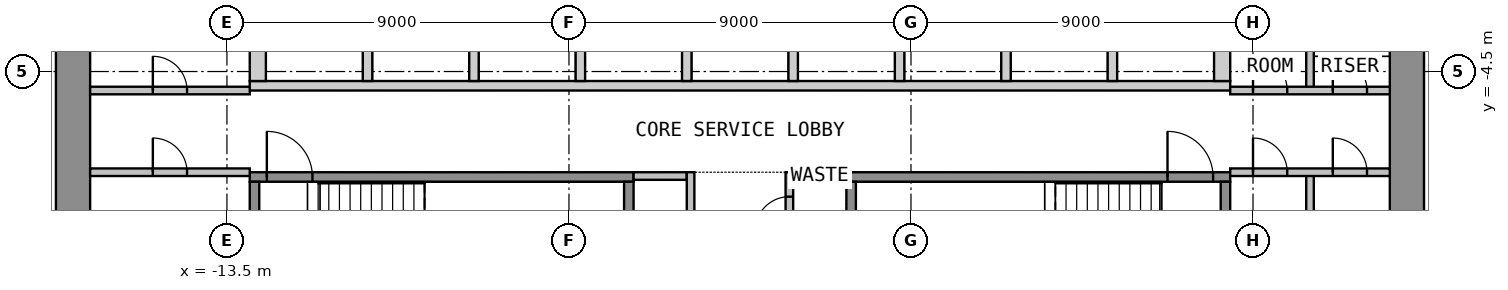
"""IFC4 building model, lengths in metres.
Left out: names, types, materials, properties, quantities, classifications, styles, units other than length and angle.
Written with IfcOpenShell. Run it as: python <this file> out.ifc"""

import sys

from ifc_helpers import new_model, si_unit, direction, frame, frame_2d, origin, place, context, subcontext, project, spatial, polyline, rectangle, outline, extrude, element, fill, save


model = new_model("IFC4")
c1 = context("Model", 3, precision=1e-05, world=origin(), true_north=direction((0.0, 1.0)))
c2 = subcontext(c1, "Body", "Model", "MODEL_VIEW")
j1 = project(units=[si_unit("LENGTHUNIT", "METRE"), si_unit("PLANEANGLEUNIT", "RADIAN")], contexts=[c1])
p1 = place(None, origin())
s1 = spatial("IfcSite", under=j1, at=p1, CompositionType="ELEMENT")
p2 = place(p1, origin())
s2 = spatial("IfcBuilding", under=s1, at=p2, CompositionType="ELEMENT")
p3 = place(p2, frame((0.0, 0.0, 30.0)))
s3 = spatial("IfcBuildingStorey", under=s2, at=p3, CompositionType="ELEMENT", Elevation=30.0)
p4 = place(p3, frame((-17.55, -12.6, 0.0), z_axis=(0.0, 0.0, 1.0), x_axis=(0.0, 1.0, 0.0)))
e1 = element("IfcWall", 1, at=p4, inside=s3, PredefinedType="SHEAR", context=c2, shape_type="SweptSolid", body=[
    extrude(rectangle(XDim=25.2, YDim=0.9, at=frame_2d((12.6, 0.0))), origin(), (0.0, 0.0, 1.0), 3.525),
])
p5 = place(p4, frame((11.4, 0.0, 0.0)))
e2 = element("IfcOpeningElement", 2, at=p5, cuts=e1, PredefinedType="OPENING", context=c2, shape_type="SweptSolid", body=[
    extrude(rectangle(XDim=2.4, YDim=2.1, at=frame_2d((1.2, 1.05))), frame((0.0, 0.46, 0.0), z_axis=(0.0, -1.0, 0.0), x_axis=(1.0, 0.0, 0.0)), (0.0, 0.0, 1.0), 0.92),
])
p6 = place(p3, frame((17.55, -12.6, 0.0), z_axis=(0.0, 0.0, 1.0), x_axis=(0.0, 1.0, 0.0)))
e3 = element("IfcWall", 3, at=p6, inside=s3, PredefinedType="SHEAR", context=c2, shape_type="SweptSolid", body=[
    extrude(rectangle(XDim=25.2, YDim=0.9, at=frame_2d((12.6, 0.0))), origin(), (0.0, 0.0, 1.0), 3.525),
])
p7 = place(p6, frame((11.4, 0.0, 0.0)))
e4 = element("IfcOpeningElement", 4, at=p7, cuts=e3, PredefinedType="OPENING", context=c2, shape_type="SweptSolid", body=[
    extrude(rectangle(XDim=2.4, YDim=2.1, at=frame_2d((1.2, 1.05))), frame((0.0, 0.46, 0.0), z_axis=(0.0, -1.0, 0.0), x_axis=(1.0, 0.0, 0.0)), (0.0, 0.0, 1.0), 0.92),
])
p8 = place(p3, origin())
e5 = element("IfcWall", 5, at=p8, inside=s3, PredefinedType="SHEAR", context=c2, shape_type="SweptSolid", body=[
    extrude(outline(polyline([(-12.9, -5.0), (12.9, -5.0), (12.9, -4.75), (-12.9, -4.75), (-12.9, -5.0)])), origin(), (0.0, 0.0, 1.0), 3.525),
])
p9 = place(p3, origin())
e6 = element("IfcWall", 6, at=p9, inside=s3, PredefinedType="SHEAR", context=c2, shape_type="SweptSolid", body=[
    extrude(outline(polyline([(-12.9, -4.75), (-12.475, -4.75), (-12.475, -2.05), (-12.9, -2.05), (-12.9, -4.75)])), origin(), (0.0, 0.0, 1.0), 3.525),
])
p10 = place(p3, origin())
e7 = element("IfcWall", 7, at=p10, inside=s3, PredefinedType="SHEAR", context=c2, shape_type="SweptSolid", body=[
    extrude(outline(polyline([(-9.925, -4.75), (-9.675, -4.75), (-9.675, -2.05), (-9.925, -2.05), (-9.925, -4.75)])), origin(), (0.0, 0.0, 1.0), 3.525),
])
p11 = place(p3, origin())
e8 = element("IfcWall", 8, at=p11, inside=s3, PredefinedType="SHEAR", context=c2, shape_type="SweptSolid", body=[
    extrude(outline(polyline([(-7.125, -4.75), (-6.875, -4.75), (-6.875, -2.05), (-7.125, -2.05), (-7.125, -4.75)])), origin(), (0.0, 0.0, 1.0), 3.525),
])
p12 = place(p3, origin())
e9 = element("IfcWall", 9, at=p12, inside=s3, PredefinedType="SHEAR", context=c2, shape_type="SweptSolid", body=[
    extrude(outline(polyline([(-4.325, -4.75), (-4.075, -4.75), (-4.075, -2.05), (-4.325, -2.05), (-4.325, -4.75)])), origin(), (0.0, 0.0, 1.0), 3.525),
])
p13 = place(p3, origin())
e10 = element("IfcWall", 10, at=p13, inside=s3, PredefinedType="SHEAR", context=c2, shape_type="SweptSolid", body=[
    extrude(outline(polyline([(-1.525, -4.75), (-1.275, -4.75), (-1.275, -2.05), (-1.525, -2.05), (-1.525, -4.75)])), origin(), (0.0, 0.0, 1.0), 3.525),
])
p14 = place(p3, origin())
e11 = element("IfcWall", 11, at=p14, inside=s3, PredefinedType="SHEAR", context=c2, shape_type="SweptSolid", body=[
    extrude(outline(polyline([(1.275, -4.75), (1.525, -4.75), (1.525, -2.05), (1.275, -2.05), (1.275, -4.75)])), origin(), (0.0, 0.0, 1.0), 3.525),
])
p15 = place(p3, origin())
e12 = element("IfcWall", 12, at=p15, inside=s3, PredefinedType="SHEAR", context=c2, shape_type="SweptSolid", body=[
    extrude(outline(polyline([(4.075, -4.75), (4.325, -4.75), (4.325, -2.05), (4.075, -2.05), (4.075, -4.75)])), origin(), (0.0, 0.0, 1.0), 3.525),
])
p16 = place(p3, origin())
e13 = element("IfcWall", 13, at=p16, inside=s3, PredefinedType="SHEAR", context=c2, shape_type="SweptSolid", body=[
    extrude(outline(polyline([(6.875, -4.75), (7.125, -4.75), (7.125, -2.05), (6.875, -2.05), (6.875, -4.75)])), origin(), (0.0, 0.0, 1.0), 3.525),
])
p17 = place(p3, origin())
e14 = element("IfcWall", 14, at=p17, inside=s3, PredefinedType="SHEAR", context=c2, shape_type="SweptSolid", body=[
    extrude(outline(polyline([(9.675, -4.75), (9.925, -4.75), (9.925, -2.05), (9.675, -2.05), (9.675, -4.75)])), origin(), (0.0, 0.0, 1.0), 3.525),
])
p18 = place(p3, origin())
e15 = element("IfcWall", 15, at=p18, inside=s3, PredefinedType="SHEAR", context=c2, shape_type="SweptSolid", body=[
    extrude(outline(polyline([(12.475, -4.75), (12.9, -4.75), (12.9, -2.05), (12.475, -2.05), (12.475, -4.75)])), origin(), (0.0, 0.0, 1.0), 3.525),
])
p19 = place(p3, frame((-12.9, -7.275, 0.0), z_axis=(0.0, 0.0, 1.0), x_axis=(1.0, 0.0, 0.0)))
e16 = element("IfcWall", 16, at=p19, inside=s3, PredefinedType="SHEAR", context=c2, shape_type="SweptSolid", body=[
    extrude(rectangle(XDim=10.1, YDim=0.25, at=frame_2d((5.05, 0.0))), origin(), (0.0, 0.0, 1.0), 3.525),
])
p20 = place(p19, frame((0.45, 0.0, 0.0)))
e17 = element("IfcOpeningElement", 17, at=p20, cuts=e16, PredefinedType="OPENING", context=c2, shape_type="SweptSolid", body=[
    extrude(rectangle(XDim=1.2, YDim=2.1, at=frame_2d((0.6, 1.05))), frame((0.0, 0.135, 0.0), z_axis=(0.0, -1.0, 0.0), x_axis=(1.0, 0.0, 0.0)), (0.0, 0.0, 1.0), 0.27),
])
for number, where, z_axis, x_axis in (
    (18, (-12.775, -10.65, 0.0), (0.0, 0.0, 1.0), (0.0, 1.0, 0.0)),
    (19, (-2.925, -10.65, 0.0), (0.0, 0.0, 1.0), (0.0, 1.0, 0.0)),
):
    element("IfcWall", number, at=place(p3, frame(where, z_axis=z_axis, x_axis=x_axis)), inside=s3, PredefinedType="SHEAR", context=c2, shape_type="SweptSolid", body=[
        extrude(rectangle(XDim=3.25, YDim=0.25, at=frame_2d((1.625, 0.0))), origin(), (0.0, 0.0, 1.0), 3.525),
    ])
p21 = place(p3, frame((2.8, -7.275, 0.0), z_axis=(0.0, 0.0, 1.0), x_axis=(1.0, 0.0, 0.0)))
e20 = element("IfcWall", 20, at=p21, inside=s3, PredefinedType="SHEAR", context=c2, shape_type="SweptSolid", body=[
    extrude(rectangle(XDim=10.1, YDim=0.25, at=frame_2d((5.05, 0.0))), origin(), (0.0, 0.0, 1.0), 3.525),
])
p22 = place(p21, frame((8.45, 0.0, 0.0)))
e21 = element("IfcOpeningElement", 21, at=p22, cuts=e20, PredefinedType="OPENING", context=c2, shape_type="SweptSolid", body=[
    extrude(rectangle(XDim=1.2, YDim=2.1, at=frame_2d((0.6, 1.05))), frame((0.0, 0.135, 0.0), z_axis=(0.0, -1.0, 0.0), x_axis=(1.0, 0.0, 0.0)), (0.0, 0.0, 1.0), 0.27),
])
for number, where, z_axis, x_axis in (
    (22, (2.925, -10.65, 0.0), (0.0, 0.0, 1.0), (0.0, 1.0, 0.0)),
    (23, (12.775, -10.65, 0.0), (0.0, 0.0, 1.0), (0.0, 1.0, 0.0)),
):
    element("IfcWall", number, at=place(p3, frame(where, z_axis=z_axis, x_axis=x_axis)), inside=s3, PredefinedType="SHEAR", context=c2, shape_type="SweptSolid", body=[
        extrude(rectangle(XDim=3.25, YDim=0.25, at=frame_2d((1.625, 0.0))), origin(), (0.0, 0.0, 1.0), 3.525),
    ])
for number, where, z_axis, x_axis in (
    (24, (-2.8, -7.25, 0.0), (0.0, 0.0, 1.0), (1.0, 0.0, 0.0)),
    (25, (1.4, -7.25, 0.0), (0.0, 0.0, 1.0), (1.0, 0.0, 0.0)),
):
    element("IfcWall", number, at=place(p3, frame(where, z_axis=z_axis, x_axis=x_axis)), inside=s3, PredefinedType="PARTITIONING", context=c2, shape_type="SweptSolid", body=[
        extrude(rectangle(XDim=1.4, YDim=0.2, at=frame_2d((0.7, 0.0))), origin(), (0.0, 0.0, 1.0), 3.525),
    ])
p23 = place(p3, frame((-1.3, -12.6, 0.0), z_axis=(0.0, 0.0, 1.0), x_axis=(0.0, 1.0, 0.0)))
e26 = element("IfcWall", 26, at=p23, inside=s3, PredefinedType="PARTITIONING", context=c2, shape_type="SweptSolid", body=[
    extrude(rectangle(XDim=5.45, YDim=0.2, at=frame_2d((2.725, 0.0))), origin(), (0.0, 0.0, 1.0), 3.525),
])
p24 = place(p23, frame((2.175, 0.0, 0.0)))
e27 = element("IfcOpeningElement", 27, at=p24, cuts=e26, PredefinedType="OPENING", context=c2, shape_type="SweptSolid", body=[
    extrude(rectangle(XDim=0.9, YDim=2.1, at=frame_2d((0.45, 1.05))), frame((0.0, 0.11, 0.0), z_axis=(0.0, -1.0, 0.0), x_axis=(1.0, 0.0, 0.0)), (0.0, 0.0, 1.0), 0.22),
])
p25 = place(p3, frame((1.3, -12.6, 0.0), z_axis=(0.0, 0.0, 1.0), x_axis=(0.0, 1.0, 0.0)))
e28 = element("IfcWall", 28, at=p25, inside=s3, PredefinedType="PARTITIONING", context=c2, shape_type="SweptSolid", body=[
    extrude(rectangle(XDim=5.45, YDim=0.2, at=frame_2d((2.725, 0.0))), origin(), (0.0, 0.0, 1.0), 3.525),
])
p26 = place(p25, frame((0.416, 0.0, 0.0)))
e29 = element("IfcOpeningElement", 29, at=p26, cuts=e28, PredefinedType="OPENING", context=c2, shape_type="SweptSolid", body=[
    extrude(rectangle(XDim=0.9, YDim=2.1, at=frame_2d((0.45, 1.05))), frame((0.0, 0.11, 0.0), z_axis=(0.0, -1.0, 0.0), x_axis=(1.0, 0.0, 0.0)), (0.0, 0.0, 1.0), 0.22),
])
p27 = place(p25, frame((2.149, 0.0, 0.0)))
e30 = element("IfcOpeningElement", 30, at=p27, cuts=e28, PredefinedType="OPENING", context=c2, shape_type="SweptSolid", body=[
    extrude(rectangle(XDim=0.9, YDim=2.1, at=frame_2d((0.45, 1.05))), frame((0.0, 0.11, 0.0), z_axis=(0.0, -1.0, 0.0), x_axis=(1.0, 0.0, 0.0)), (0.0, 0.0, 1.0), 0.22),
])
p28 = place(p25, frame((3.907, 0.0, 0.0)))
e31 = element("IfcOpeningElement", 31, at=p28, cuts=e28, PredefinedType="OPENING", context=c2, shape_type="SweptSolid", body=[
    extrude(rectangle(XDim=0.9, YDim=2.1, at=frame_2d((0.45, 1.05))), frame((0.0, 0.11, 0.0), z_axis=(0.0, -1.0, 0.0), x_axis=(1.0, 0.0, 0.0)), (0.0, 0.0, 1.0), 0.22),
])
p29 = place(p3, frame((-17.1, -7.15, 0.0), z_axis=(0.0, 0.0, 1.0), x_axis=(1.0, 0.0, 0.0)))
e32 = element("IfcWall", 32, at=p29, inside=s3, PredefinedType="PARTITIONING", context=c2, shape_type="SweptSolid", body=[
    extrude(rectangle(XDim=4.2, YDim=0.2, at=frame_2d((2.1, 0.0))), origin(), (0.0, 0.0, 1.0), 3.525),
])
p30 = place(p29, frame((1.65, 0.0, 0.0)))
e33 = element("IfcOpeningElement", 33, at=p30, cuts=e32, PredefinedType="OPENING", context=c2, shape_type="SweptSolid", body=[
    extrude(rectangle(XDim=0.9, YDim=2.1, at=frame_2d((0.45, 1.05))), frame((0.0, 0.11, 0.0), z_axis=(0.0, -1.0, 0.0), x_axis=(1.0, 0.0, 0.0)), (0.0, 0.0, 1.0), 0.22),
])
p31 = place(p3, frame((-17.1, -5.0, 0.0), z_axis=(0.0, 0.0, 1.0), x_axis=(1.0, 0.0, 0.0)))
e34 = element("IfcWall", 34, at=p31, inside=s3, PredefinedType="PARTITIONING", context=c2, shape_type="SweptSolid", body=[
    extrude(rectangle(XDim=4.2, YDim=0.2, at=frame_2d((2.1, 0.0))), origin(), (0.0, 0.0, 1.0), 3.525),
])
p32 = place(p31, frame((1.65, 0.0, 0.0)))
e35 = element("IfcOpeningElement", 35, at=p32, cuts=e34, PredefinedType="OPENING", context=c2, shape_type="SweptSolid", body=[
    extrude(rectangle(XDim=0.9, YDim=2.1, at=frame_2d((0.45, 1.05))), frame((0.0, 0.11, 0.0), z_axis=(0.0, -1.0, 0.0), x_axis=(1.0, 0.0, 0.0)), (0.0, 0.0, 1.0), 0.22),
])
p33 = place(p3, frame((15.0, -12.6, 0.0), z_axis=(0.0, 0.0, 1.0), x_axis=(0.0, 1.0, 0.0)))
e36 = element("IfcWall", 36, at=p33, inside=s3, PredefinedType="PARTITIONING", context=c2, shape_type="SweptSolid", body=[
    extrude(rectangle(XDim=5.45, YDim=0.2, at=frame_2d((2.725, 0.0))), origin(), (0.0, 0.0, 1.0), 3.525),
])
p34 = place(p3, frame((12.9, -7.15, 0.0), z_axis=(0.0, 0.0, 1.0), x_axis=(1.0, 0.0, 0.0)))
e37 = element("IfcWall", 37, at=p34, inside=s3, PredefinedType="PARTITIONING", context=c2, shape_type="SweptSolid", body=[
    extrude(rectangle(XDim=4.2, YDim=0.2, at=frame_2d((2.1, 0.0))), origin(), (0.0, 0.0, 1.0), 3.525),
])
p35 = place(p34, frame((0.6, 0.0, 0.0)))
e38 = element("IfcOpeningElement", 38, at=p35, cuts=e37, PredefinedType="OPENING", context=c2, shape_type="SweptSolid", body=[
    extrude(rectangle(XDim=0.9, YDim=2.1, at=frame_2d((0.45, 1.05))), frame((0.0, 0.11, 0.0), z_axis=(0.0, -1.0, 0.0), x_axis=(1.0, 0.0, 0.0)), (0.0, 0.0, 1.0), 0.22),
])
p36 = place(p34, frame((2.7, 0.0, 0.0)))
e39 = element("IfcOpeningElement", 39, at=p36, cuts=e37, PredefinedType="OPENING", context=c2, shape_type="SweptSolid", body=[
    extrude(rectangle(XDim=0.9, YDim=2.1, at=frame_2d((0.45, 1.05))), frame((0.0, 0.11, 0.0), z_axis=(0.0, -1.0, 0.0), x_axis=(1.0, 0.0, 0.0)), (0.0, 0.0, 1.0), 0.22),
])
p37 = place(p3, frame((15.0, -5.0, 0.0), z_axis=(0.0, 0.0, 1.0), x_axis=(0.0, 1.0, 0.0)))
e40 = element("IfcWall", 40, at=p37, inside=s3, PredefinedType="PARTITIONING", context=c2, shape_type="SweptSolid", body=[
    extrude(rectangle(XDim=3.2, YDim=0.2, at=frame_2d((1.6, 0.0))), origin(), (0.0, 0.0, 1.0), 3.525),
])
p38 = place(p3, frame((12.9, -5.0, 0.0), z_axis=(0.0, 0.0, 1.0), x_axis=(1.0, 0.0, 0.0)))
e41 = element("IfcWall", 41, at=p38, inside=s3, PredefinedType="PARTITIONING", context=c2, shape_type="SweptSolid", body=[
    extrude(rectangle(XDim=4.2, YDim=0.2, at=frame_2d((2.1, 0.0))), origin(), (0.0, 0.0, 1.0), 3.525),
])
p39 = place(p38, frame((0.6, 0.0, 0.0)))
e42 = element("IfcOpeningElement", 42, at=p39, cuts=e41, PredefinedType="OPENING", context=c2, shape_type="SweptSolid", body=[
    extrude(rectangle(XDim=0.9, YDim=2.1, at=frame_2d((0.45, 1.05))), frame((0.0, 0.11, 0.0), z_axis=(0.0, -1.0, 0.0), x_axis=(1.0, 0.0, 0.0)), (0.0, 0.0, 1.0), 0.22),
])
p40 = place(p38, frame((2.7, 0.0, 0.0)))
e43 = element("IfcOpeningElement", 43, at=p40, cuts=e41, PredefinedType="OPENING", context=c2, shape_type="SweptSolid", body=[
    extrude(rectangle(XDim=0.9, YDim=2.1, at=frame_2d((0.45, 1.05))), frame((0.0, 0.11, 0.0), z_axis=(0.0, -1.0, 0.0), x_axis=(1.0, 0.0, 0.0)), (0.0, 0.0, 1.0), 0.22),
])
p41 = place(p20, origin())
e44 = element("IfcDoor", 44, at=p41, inside=s3, OperationType="SINGLE_SWING_LEFT", PredefinedType="DOOR", context=c2, shape_type="SweptSolid", body=[
    extrude(rectangle(XDim=1.2, YDim=2.1, at=frame_2d((0.6, 1.05))), frame((0.0, 0.025, 0.0), z_axis=(0.0, -1.0, 0.0), x_axis=(1.0, 0.0, 0.0)), (0.0, 0.0, 1.0), 0.05),
])
fill(e17, e44)
p42 = place(p22, origin())
e45 = element("IfcDoor", 45, at=p42, inside=s3, OperationType="SINGLE_SWING_LEFT", PredefinedType="DOOR", context=c2, shape_type="SweptSolid", body=[
    extrude(rectangle(XDim=1.2, YDim=2.1, at=frame_2d((0.6, 1.05))), frame((0.0, 0.025, 0.0), z_axis=(0.0, -1.0, 0.0), x_axis=(1.0, 0.0, 0.0)), (0.0, 0.0, 1.0), 0.05),
])
fill(e21, e45)
p43 = place(p28, origin())
e46 = element("IfcDoor", 46, at=p43, inside=s3, OperationType="SINGLE_SWING_LEFT", PredefinedType="DOOR", context=c2, shape_type="SweptSolid", body=[
    extrude(rectangle(XDim=0.9, YDim=2.1, at=frame_2d((0.45, 1.05))), frame((0.0, 0.025, 0.0), z_axis=(0.0, -1.0, 0.0), x_axis=(1.0, 0.0, 0.0)), (0.0, 0.0, 1.0), 0.05),
])
fill(e31, e46)
p44 = place(p30, origin())
e47 = element("IfcDoor", 47, at=p44, inside=s3, OperationType="SINGLE_SWING_LEFT", PredefinedType="DOOR", context=c2, shape_type="SweptSolid", body=[
    extrude(rectangle(XDim=0.9, YDim=2.1, at=frame_2d((0.45, 1.05))), frame((0.0, 0.025, 0.0), z_axis=(0.0, -1.0, 0.0), x_axis=(1.0, 0.0, 0.0)), (0.0, 0.0, 1.0), 0.05),
])
fill(e33, e47)
p45 = place(p32, origin())
e48 = element("IfcDoor", 48, at=p45, inside=s3, OperationType="SINGLE_SWING_LEFT", PredefinedType="DOOR", context=c2, shape_type="SweptSolid", body=[
    extrude(rectangle(XDim=0.9, YDim=2.1, at=frame_2d((0.45, 1.05))), frame((0.0, 0.025, 0.0), z_axis=(0.0, -1.0, 0.0), x_axis=(1.0, 0.0, 0.0)), (0.0, 0.0, 1.0), 0.05),
])
fill(e35, e48)
p46 = place(p35, origin())
e49 = element("IfcDoor", 49, at=p46, inside=s3, OperationType="SINGLE_SWING_LEFT", PredefinedType="DOOR", context=c2, shape_type="SweptSolid", body=[
    extrude(rectangle(XDim=0.9, YDim=2.1, at=frame_2d((0.45, 1.05))), frame((0.0, 0.025, 0.0), z_axis=(0.0, -1.0, 0.0), x_axis=(1.0, 0.0, 0.0)), (0.0, 0.0, 1.0), 0.05),
])
fill(e38, e49)
p47 = place(p36, origin())
e50 = element("IfcDoor", 50, at=p47, inside=s3, OperationType="SINGLE_SWING_LEFT", PredefinedType="DOOR", context=c2, shape_type="SweptSolid", body=[
    extrude(rectangle(XDim=0.9, YDim=2.1, at=frame_2d((0.45, 1.05))), frame((0.0, 0.025, 0.0), z_axis=(0.0, -1.0, 0.0), x_axis=(1.0, 0.0, 0.0)), (0.0, 0.0, 1.0), 0.05),
])
fill(e39, e50)
p48 = place(p39, origin())
e51 = element("IfcDoor", 51, at=p48, inside=s3, OperationType="SINGLE_SWING_LEFT", PredefinedType="DOOR", context=c2, shape_type="SweptSolid", body=[
    extrude(rectangle(XDim=0.9, YDim=2.1, at=frame_2d((0.45, 1.05))), frame((0.0, 0.025, 0.0), z_axis=(0.0, -1.0, 0.0), x_axis=(1.0, 0.0, 0.0)), (0.0, 0.0, 1.0), 0.05),
])
fill(e42, e51)
p49 = place(p40, origin())
e52 = element("IfcDoor", 52, at=p49, inside=s3, OperationType="SINGLE_SWING_LEFT", PredefinedType="DOOR", context=c2, shape_type="SweptSolid", body=[
    extrude(rectangle(XDim=0.9, YDim=2.1, at=frame_2d((0.45, 1.05))), frame((0.0, 0.025, 0.0), z_axis=(0.0, -1.0, 0.0), x_axis=(1.0, 0.0, 0.0)), (0.0, 0.0, 1.0), 0.05),
])
fill(e43, e52)
save(model, sys.argv[1])
